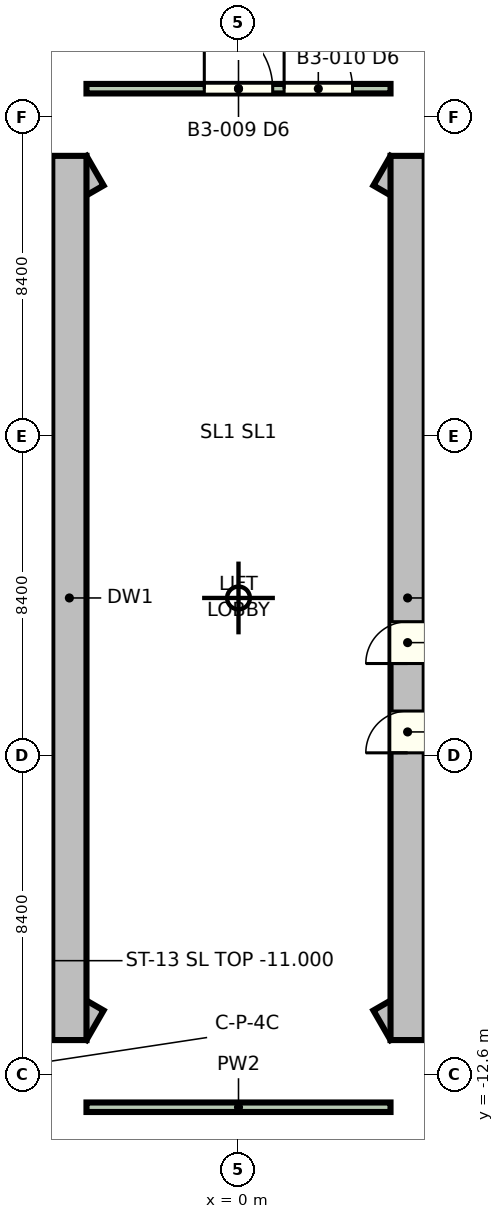
"""IFC4 building model, lengths in metres.
Left out: names, types, materials, properties, quantities, classifications, styles, units other than length and angle.
Written with IfcOpenShell. Run it as: python <this file> out.ifc"""

import sys

from ifc_helpers import new_model, si_unit, direction, frame, frame_2d, origin, place, context, subcontext, project, spatial, rectangle, extrude, element, fill, save


model = new_model("IFC4")
c1 = context("Model", 3, precision=1e-05, world=origin(), true_north=direction((0.0, 1.0)))
c2 = subcontext(c1, "Body", "Model", "MODEL_VIEW")
j1 = project(units=[si_unit("LENGTHUNIT", "METRE"), si_unit("PLANEANGLEUNIT", "RADIAN")], contexts=[c1])
p1 = place(None, origin())
s1 = spatial("IfcSite", under=j1, at=p1, CompositionType="ELEMENT")
p2 = place(p1, origin())
s2 = spatial("IfcBuilding", under=s1, at=p2, CompositionType="ELEMENT")
p3 = place(p2, frame((0.0, 0.0, -13.0)))
s3 = spatial("IfcBuildingStorey", under=s2, at=p3, CompositionType="ELEMENT", Elevation=-13.0)
for number, where, z_axis, x_axis in (
    (1, (-3.775, -11.243, 0.0), (0.0, 0.0, 1.0), (-0.866, 0.5, 0.0)),
    (2, (-8.614, 8.449, 0.0), (0.0, 0.0, 1.0), (0.866, 0.5, 0.0)),
):
    element("IfcWall", number, at=place(p3, frame(where, z_axis=z_axis, x_axis=x_axis)), inside=s3, PredefinedType="SHEAR", context=c2, shape_type="SweptSolid", body=[
        extrude(rectangle(XDim=5.587, YDim=0.9, at=frame_2d((2.794, 0.0))), origin(), (0.0, 0.0, 1.0), 3.7),
    ])
p4 = place(p3, frame((-4.45, 11.633, 0.0), z_axis=(0.0, 0.0, 1.0), x_axis=(0.0, -1.0, 0.0)))
e3 = element("IfcWall", 3, at=p4, inside=s3, PredefinedType="SHEAR", context=c2, shape_type="SweptSolid", body=[
    extrude(rectangle(XDim=23.265, YDim=0.9, at=frame_2d((11.633, 0.0))), origin(), (0.0, 0.0, 1.0), 3.7),
])
for number, where, z_axis, x_axis in (
    (4, (3.775, 11.243, 0.0), (0.0, 0.0, 1.0), (0.866, -0.5, 0.0)),
    (5, (8.614, -8.449, 0.0), (0.0, 0.0, 1.0), (-0.866, -0.5, 0.0)),
):
    element("IfcWall", number, at=place(p3, frame(where, z_axis=z_axis, x_axis=x_axis)), inside=s3, PredefinedType="SHEAR", context=c2, shape_type="SweptSolid", body=[
        extrude(rectangle(XDim=5.587, YDim=0.9, at=frame_2d((2.794, 0.0))), origin(), (0.0, 0.0, 1.0), 3.7),
    ])
p5 = place(p3, frame((4.45, -11.633, 0.0), z_axis=(0.0, 0.0, 1.0), x_axis=(0.0, 1.0, 0.0)))
e6 = element("IfcWall", 6, at=p5, inside=s3, PredefinedType="SHEAR", context=c2, shape_type="SweptSolid", body=[
    extrude(rectangle(XDim=23.265, YDim=0.9, at=frame_2d((11.633, 0.0))), origin(), (0.0, 0.0, 1.0), 3.7),
])
p6 = place(p5, frame((7.558, 0.0, 0.0)))
e7 = element("IfcOpeningElement", 7, at=p6, cuts=e6, PredefinedType="OPENING", context=c2, shape_type="SweptSolid", body=[
    extrude(rectangle(XDim=1.1, YDim=2.1, at=frame_2d((0.55, 1.05))), frame((0.0, 0.46, 0.0), z_axis=(0.0, -1.0, 0.0), x_axis=(1.0, 0.0, 0.0)), (0.0, 0.0, 1.0), 0.92),
])
p7 = place(p5, frame((9.907, 0.0, 0.0)))
e8 = element("IfcOpeningElement", 8, at=p7, cuts=e6, PredefinedType="OPENING", context=c2, shape_type="SweptSolid", body=[
    extrude(rectangle(XDim=1.1, YDim=2.1, at=frame_2d((0.55, 1.05))), frame((0.0, 0.46, 0.0), z_axis=(0.0, -1.0, 0.0), x_axis=(1.0, 0.0, 0.0)), (0.0, 0.0, 1.0), 0.92),
])
p8 = place(p3, frame((-4.0, 13.4, 0.0), z_axis=(0.0, 0.0, 1.0), x_axis=(1.0, 0.0, 0.0)))
e9 = element("IfcWall", 9, at=p8, inside=s3, PredefinedType="PARTITIONING", context=c2, shape_type="SweptSolid", body=[
    extrude(rectangle(XDim=8.0, YDim=0.25, at=frame_2d((4.0, 0.0))), origin(), (0.0, 0.0, 1.0), 3.7),
])
p9 = place(p8, frame((3.1, 0.0, 0.0)))
e10 = element("IfcOpeningElement", 10, at=p9, cuts=e9, PredefinedType="OPENING", context=c2, shape_type="SweptSolid", body=[
    extrude(rectangle(XDim=1.8, YDim=2.1, at=frame_2d((0.9, 1.05))), frame((0.0, 0.135, 0.0), z_axis=(0.0, -1.0, 0.0), x_axis=(1.0, 0.0, 0.0)), (0.0, 0.0, 1.0), 0.27),
])
p10 = place(p8, frame((5.2, 0.0, 0.0)))
e11 = element("IfcOpeningElement", 11, at=p10, cuts=e9, PredefinedType="OPENING", context=c2, shape_type="SweptSolid", body=[
    extrude(rectangle(XDim=1.8, YDim=2.1, at=frame_2d((0.9, 1.05))), frame((0.0, 0.135, 0.0), z_axis=(0.0, -1.0, 0.0), x_axis=(1.0, 0.0, 0.0)), (0.0, 0.0, 1.0), 0.27),
])
p11 = place(p3, frame((-4.0, -13.4, 0.0), z_axis=(0.0, 0.0, 1.0), x_axis=(1.0, 0.0, 0.0)))
e12 = element("IfcWall", 12, at=p11, inside=s3, PredefinedType="PARTITIONING", context=c2, shape_type="SweptSolid", body=[
    extrude(rectangle(XDim=8.0, YDim=0.25, at=frame_2d((4.0, 0.0))), origin(), (0.0, 0.0, 1.0), 3.7),
])
p12 = place(p6, origin())
e13 = element("IfcDoor", 13, at=p12, inside=s3, OperationType="SLIDING_TO_LEFT", PredefinedType="DOOR", context=c2, shape_type="SweptSolid", body=[
    extrude(rectangle(XDim=1.1, YDim=2.1, at=frame_2d((0.55, 1.05))), frame((0.0, 0.025, 0.0), z_axis=(0.0, -1.0, 0.0), x_axis=(1.0, 0.0, 0.0)), (0.0, 0.0, 1.0), 0.05),
])
fill(e7, e13)
p13 = place(p7, origin())
e14 = element("IfcDoor", 14, at=p13, inside=s3, OperationType="SLIDING_TO_LEFT", PredefinedType="DOOR", context=c2, shape_type="SweptSolid", body=[
    extrude(rectangle(XDim=1.1, YDim=2.1, at=frame_2d((0.55, 1.05))), frame((0.0, 0.025, 0.0), z_axis=(0.0, -1.0, 0.0), x_axis=(1.0, 0.0, 0.0)), (0.0, 0.0, 1.0), 0.05),
])
fill(e8, e14)
p14 = place(p9, origin())
e15 = element("IfcDoor", 15, at=p14, inside=s3, OperationType="DOUBLE_DOOR_SINGLE_SWING", PredefinedType="DOOR", context=c2, shape_type="SweptSolid", body=[
    extrude(rectangle(XDim=1.8, YDim=2.1, at=frame_2d((0.9, 1.05))), frame((0.0, 0.025, 0.0), z_axis=(0.0, -1.0, 0.0), x_axis=(1.0, 0.0, 0.0)), (0.0, 0.0, 1.0), 0.05),
])
fill(e10, e15)
p15 = place(p10, origin())
e16 = element("IfcDoor", 16, at=p15, inside=s3, OperationType="DOUBLE_DOOR_SINGLE_SWING", PredefinedType="DOOR", context=c2, shape_type="SweptSolid", body=[
    extrude(rectangle(XDim=1.8, YDim=2.1, at=frame_2d((0.9, 1.05))), frame((0.0, 0.025, 0.0), z_axis=(0.0, -1.0, 0.0), x_axis=(1.0, 0.0, 0.0)), (0.0, 0.0, 1.0), 0.05),
])
fill(e11, e16)
save(model, sys.argv[1])
